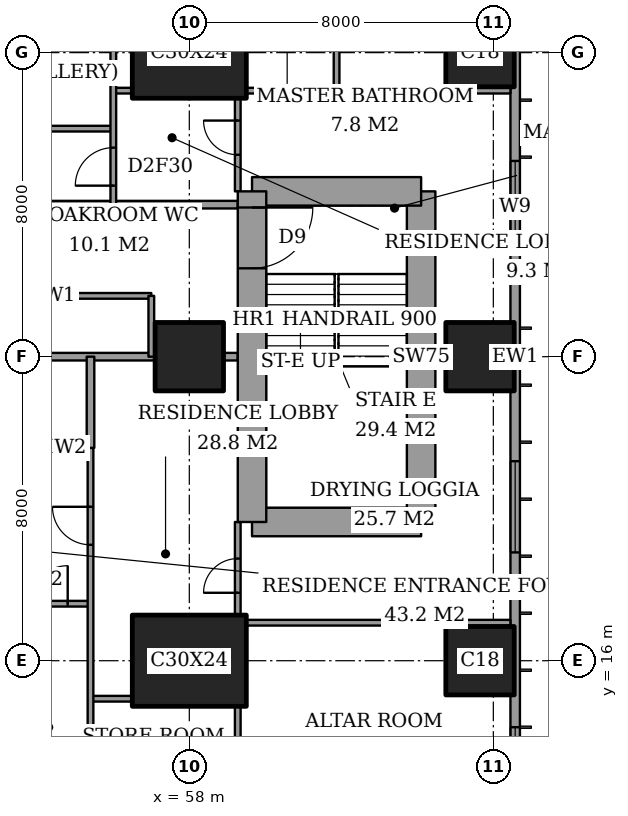
"""IFC4 building model, lengths in metres.
Left out: names, types, materials, properties, quantities, classifications, styles, units other than length and angle.
Written with IfcOpenShell. Run it as: python <this file> out.ifc"""

import sys

from ifc_helpers import new_model, si_unit, direction, frame, frame_2d, origin, origin_2d, place, context, subcontext, project, spatial, rectangle, extrude, element, fill, save


model = new_model("IFC4")
c1 = context("Model", 3, precision=1e-05, world=origin(), true_north=direction((0.0, 1.0)))
c2 = subcontext(c1, "Body", "Model", "MODEL_VIEW")
j1 = project(units=[si_unit("LENGTHUNIT", "METRE"), si_unit("PLANEANGLEUNIT", "RADIAN")], contexts=[c1])
p1 = place(None, origin())
s1 = spatial("IfcSite", under=j1, at=p1, CompositionType="ELEMENT")
p2 = place(p1, origin())
s2 = spatial("IfcBuilding", under=s1, at=p2, CompositionType="ELEMENT")
p3 = place(p2, frame((0.0, 0.0, 218.2)))
s3 = spatial("IfcBuildingStorey", under=s2, at=p3, CompositionType="ELEMENT", Elevation=218.2)
p4 = place(p3, frame((58.0, 16.0, 0.0), z_axis=(0.0, 0.0, 1.0), x_axis=(1.0, 0.0, 0.0)))
e1 = element("IfcColumn", 1, at=p4, inside=s3, PredefinedType="COLUMN", context=c2, shape_type="SweptSolid", body=[
    extrude(rectangle(XDim=3.0, YDim=2.4, at=origin_2d()), origin(), (0.0, 0.0, 1.0), 3.6),
])
p5 = place(p3, frame((58.0, 24.0, 0.0), z_axis=(0.0, 0.0, 1.0), x_axis=(1.0, 0.0, 0.0)))
e2 = element("IfcColumn", 2, at=p5, inside=s3, PredefinedType="COLUMN", context=c2, shape_type="SweptSolid", body=[
    extrude(rectangle(XDim=1.8, YDim=1.8, at=origin_2d()), origin(), (0.0, 0.0, 1.0), 3.6),
])
p6 = place(p3, frame((58.0, 32.0, 0.0), z_axis=(0.0, 0.0, 1.0), x_axis=(1.0, 0.0, 0.0)))
e3 = element("IfcColumn", 3, at=p6, inside=s3, PredefinedType="COLUMN", context=c2, shape_type="SweptSolid", body=[
    extrude(rectangle(XDim=3.0, YDim=2.4, at=origin_2d()), origin(), (0.0, 0.0, 1.0), 3.6),
])
for number, where, z_axis, x_axis in (
    (4, (65.65, 16.0, 0.0), (0.0, 0.0, 1.0), (1.0, 0.0, 0.0)),
    (5, (65.65, 24.0, 0.0), (0.0, 0.0, 1.0), (1.0, 0.0, 0.0)),
    (6, (65.65, 32.0, 0.0), (0.0, 0.0, 1.0), (1.0, 0.0, 0.0)),
):
    element("IfcColumn", number, at=place(p3, frame(where, z_axis=z_axis, x_axis=x_axis)), inside=s3, PredefinedType="COLUMN", context=c2, shape_type="SweptSolid", body=[
        extrude(rectangle(XDim=1.8, YDim=1.8, at=origin_2d()), origin(), (0.0, 0.0, 1.0), 3.6),
    ])
p7 = place(p3, frame((59.65, 19.65, 0.0), z_axis=(0.0, 0.0, 1.0), x_axis=(1.0, 0.0, 0.0)))
e7 = element("IfcWall", 7, at=p7, inside=s3, PredefinedType="SHEAR", context=c2, shape_type="SweptSolid", body=[
    extrude(rectangle(XDim=4.45, YDim=0.75, at=frame_2d((2.225, 0.0))), origin(), (0.0, 0.0, 1.0), 3.6),
])
p8 = place(p3, frame((64.1, 19.65, 0.0), z_axis=(0.0, 0.0, 1.0), x_axis=(0.0, 1.0, 0.0)))
e8 = element("IfcWall", 8, at=p8, inside=s3, PredefinedType="SHEAR", context=c2, shape_type="SweptSolid", body=[
    extrude(rectangle(XDim=8.7, YDim=0.75, at=frame_2d((4.35, 0.0))), origin(), (0.0, 0.0, 1.0), 3.6),
])
p9 = place(p3, frame((64.1, 28.35, 0.0), z_axis=(0.0, 0.0, 1.0), x_axis=(-1.0, 0.0, 0.0)))
e9 = element("IfcWall", 9, at=p9, inside=s3, PredefinedType="SHEAR", context=c2, shape_type="SweptSolid", body=[
    extrude(rectangle(XDim=4.45, YDim=0.75, at=frame_2d((2.225, 0.0))), origin(), (0.0, 0.0, 1.0), 3.6),
])
p10 = place(p3, frame((59.65, 28.35, 0.0), z_axis=(0.0, 0.0, 1.0), x_axis=(0.0, -1.0, 0.0)))
e10 = element("IfcWall", 10, at=p10, inside=s3, PredefinedType="SHEAR", context=c2, shape_type="SweptSolid", body=[
    extrude(rectangle(XDim=8.7, YDim=0.75, at=frame_2d((4.35, 0.0))), origin(), (0.0, 0.0, 1.0), 3.6),
])
p11 = place(p10, frame((0.425, 0.0, 0.0)))
e11 = element("IfcOpeningElement", 11, at=p11, cuts=e10, PredefinedType="OPENING", context=c2, shape_type="SweptSolid", body=[
    extrude(rectangle(XDim=1.6, YDim=2.1, at=frame_2d((0.8, 1.05))), frame((0.0, 0.385, 0.0), z_axis=(0.0, -1.0, 0.0), x_axis=(1.0, 0.0, 0.0)), (0.0, 0.0, 1.0), 0.77),
])
p12 = place(p3, frame((66.575, 3.175, 0.0), z_axis=(0.0, 0.0, 1.0), x_axis=(0.0, 1.0, 0.0)))
e12 = element("IfcWall", 12, at=p12, inside=s3, PredefinedType="SOLIDWALL", context=c2, shape_type="SweptSolid", body=[
    extrude(rectangle(XDim=41.65, YDim=0.25, at=frame_2d((20.825, 0.0))), origin(), (0.0, 0.0, 1.0), 3.6),
])
p13 = place(p12, frame((0.825, 0.0, 0.2)))
e13 = element("IfcOpeningElement", 13, at=p13, cuts=e12, PredefinedType="OPENING", context=c2, shape_type="SweptSolid", body=[
    extrude(rectangle(XDim=2.4, YDim=2.4, at=frame_2d((1.2, 1.2))), frame((0.0, 0.135, 0.0), z_axis=(0.0, -1.0, 0.0), x_axis=(1.0, 0.0, 0.0)), (0.0, 0.0, 1.0), 0.27),
])
p14 = place(p12, frame((6.225, 0.0, 0.2)))
e14 = element("IfcOpeningElement", 14, at=p14, cuts=e12, PredefinedType="OPENING", context=c2, shape_type="SweptSolid", body=[
    extrude(rectangle(XDim=1.2, YDim=2.4, at=frame_2d((0.6, 1.2))), frame((0.0, 0.135, 0.0), z_axis=(0.0, -1.0, 0.0), x_axis=(1.0, 0.0, 0.0)), (0.0, 0.0, 1.0), 0.27),
])
p15 = place(p12, frame((8.675, 0.0, 0.2)))
e15 = element("IfcOpeningElement", 15, at=p15, cuts=e12, PredefinedType="OPENING", context=c2, shape_type="SweptSolid", body=[
    extrude(rectangle(XDim=2.4, YDim=2.4, at=frame_2d((1.2, 1.2))), frame((0.0, 0.135, 0.0), z_axis=(0.0, -1.0, 0.0), x_axis=(1.0, 0.0, 0.0)), (0.0, 0.0, 1.0), 0.27),
])
p16 = place(p12, frame((15.675, 0.0, 0.2)))
e16 = element("IfcOpeningElement", 16, at=p16, cuts=e12, PredefinedType="OPENING", context=c2, shape_type="SweptSolid", body=[
    extrude(rectangle(XDim=2.4, YDim=2.4, at=frame_2d((1.2, 1.2))), frame((0.0, 0.135, 0.0), z_axis=(0.0, -1.0, 0.0), x_axis=(1.0, 0.0, 0.0)), (0.0, 0.0, 1.0), 0.27),
])
p17 = place(p12, frame((23.575, 0.0, 0.2)))
e17 = element("IfcOpeningElement", 17, at=p17, cuts=e12, PredefinedType="OPENING", context=c2, shape_type="SweptSolid", body=[
    extrude(rectangle(XDim=2.4, YDim=2.4, at=frame_2d((1.2, 1.2))), frame((0.0, 0.135, 0.0), z_axis=(0.0, -1.0, 0.0), x_axis=(1.0, 0.0, 0.0)), (0.0, 0.0, 1.0), 0.27),
])
p18 = place(p12, frame((30.775, 0.0, 0.2)))
e18 = element("IfcOpeningElement", 18, at=p18, cuts=e12, PredefinedType="OPENING", context=c2, shape_type="SweptSolid", body=[
    extrude(rectangle(XDim=2.4, YDim=2.4, at=frame_2d((1.2, 1.2))), frame((0.0, 0.135, 0.0), z_axis=(0.0, -1.0, 0.0), x_axis=(1.0, 0.0, 0.0)), (0.0, 0.0, 1.0), 0.27),
])
p19 = place(p12, frame((34.55, 0.0, 0.2)))
e19 = element("IfcOpeningElement", 19, at=p19, cuts=e12, PredefinedType="OPENING", context=c2, shape_type="SweptSolid", body=[
    extrude(rectangle(XDim=1.2, YDim=2.4, at=frame_2d((0.6, 1.2))), frame((0.0, 0.135, 0.0), z_axis=(0.0, -1.0, 0.0), x_axis=(1.0, 0.0, 0.0)), (0.0, 0.0, 1.0), 0.27),
])
p20 = place(p12, frame((38.425, 0.0, 0.2)))
e20 = element("IfcOpeningElement", 20, at=p20, cuts=e12, PredefinedType="OPENING", context=c2, shape_type="SweptSolid", body=[
    extrude(rectangle(XDim=2.4, YDim=2.4, at=frame_2d((1.2, 1.2))), frame((0.0, 0.135, 0.0), z_axis=(0.0, -1.0, 0.0), x_axis=(1.0, 0.0, 0.0)), (0.0, 0.0, 1.0), 0.27),
])
p21 = place(p3, frame((55.4, 15.0, 0.0), z_axis=(0.0, 0.0, 1.0), x_axis=(1.0, 0.0, 0.0)))
e21 = element("IfcWall", 21, at=p21, inside=s3, PredefinedType="PARTITIONING", context=c2, shape_type="SweptSolid", body=[
    extrude(rectangle(XDim=1.1, YDim=0.15, at=frame_2d((0.55, 0.0))), origin(), (0.0, 0.0, 1.0), 3.35),
])
p22 = place(p3, frame((59.5, 17.0, 0.0), z_axis=(0.0, 0.0, 1.0), x_axis=(1.0, 0.0, 0.0)))
e22 = element("IfcWall", 22, at=p22, inside=s3, PredefinedType="PARTITIONING", context=c2, shape_type="SweptSolid", body=[
    extrude(rectangle(XDim=6.95, YDim=0.15, at=frame_2d((3.475, 0.0))), origin(), (0.0, 0.0, 1.0), 3.35),
])
p23 = place(p3, frame((51.6, 17.5, 0.0), z_axis=(0.0, 0.0, 1.0), x_axis=(1.0, 0.0, 0.0)))
e23 = element("IfcWall", 23, at=p23, inside=s3, PredefinedType="PARTITIONING", context=c2, shape_type="SweptSolid", body=[
    extrude(rectangle(XDim=3.8, YDim=0.15, at=frame_2d((1.9, 0.0))), origin(), (0.0, 0.0, 1.0), 3.35),
])
p24 = place(p23, frame((2.2, 0.0, 0.0)))
e24 = element("IfcOpeningElement", 24, at=p24, cuts=e23, PredefinedType="OPENING", context=c2, shape_type="SweptSolid", body=[
    extrude(rectangle(XDim=1.0, YDim=2.1, at=frame_2d((0.5, 1.05))), frame((0.0, 0.085, 0.0), z_axis=(0.0, -1.0, 0.0), x_axis=(1.0, 0.0, 0.0)), (0.0, 0.0, 1.0), 0.17),
])
p25 = place(p3, frame((51.2, 21.6, 0.0), z_axis=(0.0, 0.0, 1.0), x_axis=(1.0, 0.0, 0.0)))
e25 = element("IfcWall", 25, at=p25, inside=s3, PredefinedType="PARTITIONING", context=c2, shape_type="SweptSolid", body=[
    extrude(rectangle(XDim=4.2, YDim=0.2, at=frame_2d((2.1, 0.0))), origin(), (0.0, 0.0, 1.0), 3.35),
])
p26 = place(p25, frame((1.65, 0.0, 0.0)))
e26 = element("IfcOpeningElement", 26, at=p26, cuts=e25, PredefinedType="OPENING", context=c2, shape_type="SweptSolid", body=[
    extrude(rectangle(XDim=0.9, YDim=2.1, at=frame_2d((0.45, 1.05))), frame((0.0, 0.11, 0.0), z_axis=(0.0, -1.0, 0.0), x_axis=(1.0, 0.0, 0.0)), (0.0, 0.0, 1.0), 0.22),
])
p27 = place(p3, frame((50.9, 24.0, 0.0), z_axis=(0.0, 0.0, 1.0), x_axis=(1.0, 0.0, 0.0)))
e27 = element("IfcWall", 27, at=p27, inside=s3, PredefinedType="PARTITIONING", context=c2, shape_type="SweptSolid", body=[
    extrude(rectangle(XDim=6.2, YDim=0.2, at=frame_2d((3.1, 0.0))), origin(), (0.0, 0.0, 1.0), 3.35),
])
p28 = place(p3, frame((58.9, 24.0, 0.0), z_axis=(0.0, 0.0, 1.0), x_axis=(1.0, 0.0, 0.0)))
e28 = element("IfcWall", 28, at=p28, inside=s3, PredefinedType="PARTITIONING", context=c2, shape_type="SweptSolid", body=[
    extrude(rectangle(XDim=0.375, YDim=0.2, at=frame_2d((0.188, 0.0))), origin(), (0.0, 0.0, 1.0), 3.35),
])
p29 = place(p3, frame((48.6, 25.6, 0.0), z_axis=(0.0, 0.0, 1.0), x_axis=(1.0, 0.0, 0.0)))
e29 = element("IfcWall", 29, at=p29, inside=s3, PredefinedType="PARTITIONING", context=c2, shape_type="SweptSolid", body=[
    extrude(rectangle(XDim=8.4, YDim=0.15, at=frame_2d((4.2, 0.0))), origin(), (0.0, 0.0, 1.0), 3.35),
])
p30 = place(p29, frame((3.75, 0.0, 0.0)))
e30 = element("IfcOpeningElement", 30, at=p30, cuts=e29, PredefinedType="OPENING", context=c2, shape_type="SweptSolid", body=[
    extrude(rectangle(XDim=0.9, YDim=2.1, at=frame_2d((0.45, 1.05))), frame((0.0, 0.085, 0.0), z_axis=(0.0, -1.0, 0.0), x_axis=(1.0, 0.0, 0.0)), (0.0, 0.0, 1.0), 0.17),
])
p31 = place(p3, frame((42.0, 28.0, 0.0), z_axis=(0.0, 0.0, 1.0), x_axis=(1.0, 0.0, 0.0)))
e31 = element("IfcWall", 31, at=p31, inside=s3, PredefinedType="PARTITIONING", context=c2, shape_type="SweptSolid", body=[
    extrude(rectangle(XDim=17.275, YDim=0.2, at=frame_2d((8.637, 0.0))), origin(), (0.0, 0.0, 1.0), 3.35),
])
p32 = place(p31, frame((9.4, 0.0, 0.0)))
e32 = element("IfcOpeningElement", 32, at=p32, cuts=e31, PredefinedType="OPENING", context=c2, shape_type="SweptSolid", body=[
    extrude(rectangle(XDim=1.2, YDim=2.4, at=frame_2d((0.6, 1.2))), frame((0.0, 0.11, 0.0), z_axis=(0.0, -1.0, 0.0), x_axis=(1.0, 0.0, 0.0)), (0.0, 0.0, 1.0), 0.22),
])
p33 = place(p3, frame((51.6, 30.0, 0.0), z_axis=(0.0, 0.0, 1.0), x_axis=(1.0, 0.0, 0.0)))
e33 = element("IfcWall", 33, at=p33, inside=s3, PredefinedType="PARTITIONING", context=c2, shape_type="SweptSolid", body=[
    extrude(rectangle(XDim=4.4, YDim=0.15, at=frame_2d((2.2, 0.0))), origin(), (0.0, 0.0, 1.0), 3.35),
])
p34 = place(p33, frame((0.6, 0.0, 0.0)))
e34 = element("IfcOpeningElement", 34, at=p34, cuts=e33, PredefinedType="OPENING", context=c2, shape_type="SweptSolid", body=[
    extrude(rectangle(XDim=1.0, YDim=2.1, at=frame_2d((0.5, 1.05))), frame((0.0, 0.085, 0.0), z_axis=(0.0, -1.0, 0.0), x_axis=(1.0, 0.0, 0.0)), (0.0, 0.0, 1.0), 0.17),
])
p35 = place(p3, frame((56.0, 31.0, 0.0), z_axis=(0.0, 0.0, 1.0), x_axis=(1.0, 0.0, 0.0)))
e35 = element("IfcWall", 35, at=p35, inside=s3, PredefinedType="PARTITIONING", context=c2, shape_type="SweptSolid", body=[
    extrude(rectangle(XDim=0.5, YDim=0.15, at=frame_2d((0.25, 0.0))), origin(), (0.0, 0.0, 1.0), 3.35),
])
p36 = place(p3, frame((59.5, 31.0, 0.0), z_axis=(0.0, 0.0, 1.0), x_axis=(1.0, 0.0, 0.0)))
e36 = element("IfcWall", 36, at=p36, inside=s3, PredefinedType="PARTITIONING", context=c2, shape_type="SweptSolid", body=[
    extrude(rectangle(XDim=6.95, YDim=0.15, at=frame_2d((3.475, 0.0))), origin(), (0.0, 0.0, 1.0), 3.35),
])
p37 = place(p3, frame((55.4, 21.6, 0.0), z_axis=(0.0, 0.0, 1.0), x_axis=(0.0, 1.0, 0.0)))
e37 = element("IfcWall", 37, at=p37, inside=s3, PredefinedType="PARTITIONING", context=c2, shape_type="SweptSolid", body=[
    extrude(rectangle(XDim=2.4, YDim=0.2, at=frame_2d((1.2, 0.0))), origin(), (0.0, 0.0, 1.0), 3.35),
])
p38 = place(p3, frame((55.4, 11.0, 0.0), z_axis=(0.0, 0.0, 1.0), x_axis=(0.0, 1.0, 0.0)))
e38 = element("IfcWall", 38, at=p38, inside=s3, PredefinedType="PARTITIONING", context=c2, shape_type="SweptSolid", body=[
    extrude(rectangle(XDim=10.6, YDim=0.15, at=frame_2d((5.3, 0.0))), origin(), (0.0, 0.0, 1.0), 3.35),
])
p39 = place(p38, frame((8.05, 0.0, 0.0)))
e39 = element("IfcOpeningElement", 39, at=p39, cuts=e38, PredefinedType="OPENING", context=c2, shape_type="SweptSolid", body=[
    extrude(rectangle(XDim=1.0, YDim=2.1, at=frame_2d((0.5, 1.05))), frame((0.0, 0.085, 0.0), z_axis=(0.0, -1.0, 0.0), x_axis=(1.0, 0.0, 0.0)), (0.0, 0.0, 1.0), 0.17),
])
p40 = place(p3, frame((56.0, 28.0, 0.0), z_axis=(0.0, 0.0, 1.0), x_axis=(0.0, 1.0, 0.0)))
e40 = element("IfcWall", 40, at=p40, inside=s3, PredefinedType="PARTITIONING", context=c2, shape_type="SweptSolid", body=[
    extrude(rectangle(XDim=9.4, YDim=0.15, at=frame_2d((4.7, 0.0))), origin(), (0.0, 0.0, 1.0), 3.35),
])
p41 = place(p40, frame((0.5, 0.0, 0.0)))
e41 = element("IfcOpeningElement", 41, at=p41, cuts=e40, PredefinedType="OPENING", context=c2, shape_type="SweptSolid", body=[
    extrude(rectangle(XDim=1.0, YDim=2.1, at=frame_2d((0.5, 1.05))), frame((0.0, 0.085, 0.0), z_axis=(0.0, -1.0, 0.0), x_axis=(1.0, 0.0, 0.0)), (0.0, 0.0, 1.0), 0.17),
])
p42 = place(p3, frame((57.0, 24.0, 0.0), z_axis=(0.0, 0.0, 1.0), x_axis=(0.0, 1.0, 0.0)))
e42 = element("IfcWall", 42, at=p42, inside=s3, PredefinedType="PARTITIONING", context=c2, shape_type="SweptSolid", body=[
    extrude(rectangle(XDim=1.6, YDim=0.15, at=frame_2d((0.8, 0.0))), origin(), (0.0, 0.0, 1.0), 3.35),
])
p43 = place(p3, frame((59.275, 11.0, 0.0), z_axis=(0.0, 0.0, 1.0), x_axis=(0.0, 1.0, 0.0)))
e43 = element("IfcWall", 43, at=p43, inside=s3, PredefinedType="PARTITIONING", context=c2, shape_type="SweptSolid", body=[
    extrude(rectangle(XDim=3.8, YDim=0.15, at=frame_2d((1.9, 0.0))), origin(), (0.0, 0.0, 1.0), 3.35),
])
p44 = place(p3, frame((59.275, 17.2, 0.0), z_axis=(0.0, 0.0, 1.0), x_axis=(0.0, 1.0, 0.0)))
e44 = element("IfcWall", 44, at=p44, inside=s3, PredefinedType="PARTITIONING", context=c2, shape_type="SweptSolid", body=[
    extrude(rectangle(XDim=2.45, YDim=0.15, at=frame_2d((1.225, 0.0))), origin(), (0.0, 0.0, 1.0), 3.35),
])
p45 = place(p44, frame((0.587, 0.0, 0.0)))
e45 = element("IfcOpeningElement", 45, at=p45, cuts=e44, PredefinedType="OPENING", context=c2, shape_type="SweptSolid", body=[
    extrude(rectangle(XDim=0.9, YDim=2.1, at=frame_2d((0.45, 1.05))), frame((0.0, 0.085, 0.0), z_axis=(0.0, -1.0, 0.0), x_axis=(1.0, 0.0, 0.0)), (0.0, 0.0, 1.0), 0.17),
])
p46 = place(p3, frame((59.275, 28.35, 0.0), z_axis=(0.0, 0.0, 1.0), x_axis=(0.0, 1.0, 0.0)))
e46 = element("IfcWall", 46, at=p46, inside=s3, PredefinedType="PARTITIONING", context=c2, shape_type="SweptSolid", body=[
    extrude(rectangle(XDim=2.45, YDim=0.15, at=frame_2d((1.225, 0.0))), origin(), (0.0, 0.0, 1.0), 3.35),
])
p47 = place(p46, frame((0.962, 0.0, 0.0)))
e47 = element("IfcOpeningElement", 47, at=p47, cuts=e46, PredefinedType="OPENING", context=c2, shape_type="SweptSolid", body=[
    extrude(rectangle(XDim=0.9, YDim=2.1, at=frame_2d((0.45, 1.05))), frame((0.0, 0.085, 0.0), z_axis=(0.0, -1.0, 0.0), x_axis=(1.0, 0.0, 0.0)), (0.0, 0.0, 1.0), 0.17),
])
p48 = place(p3, frame((61.875, 31.0, 0.0), z_axis=(0.0, 0.0, 1.0), x_axis=(0.0, 1.0, 0.0)))
e48 = element("IfcWall", 48, at=p48, inside=s3, PredefinedType="PARTITIONING", context=c2, shape_type="SweptSolid", body=[
    extrude(rectangle(XDim=3.0, YDim=0.15, at=frame_2d((1.5, 0.0))), origin(), (0.0, 0.0, 1.0), 3.35),
])
p49 = place(p48, frame((1.05, 0.0, 0.0)))
e49 = element("IfcOpeningElement", 49, at=p49, cuts=e48, PredefinedType="OPENING", context=c2, shape_type="SweptSolid", body=[
    extrude(rectangle(XDim=0.9, YDim=2.1, at=frame_2d((0.45, 1.05))), frame((0.0, 0.085, 0.0), z_axis=(0.0, -1.0, 0.0), x_axis=(1.0, 0.0, 0.0)), (0.0, 0.0, 1.0), 0.17),
])
p50 = place(p15, origin())
e50 = element("IfcWindow", 50, at=p50, inside=s3, PartitioningType="SINGLE_PANEL", PredefinedType="WINDOW", context=c2, shape_type="SweptSolid", body=[
    extrude(rectangle(XDim=2.4, YDim=2.4, at=frame_2d((1.2, 1.2))), frame((0.0, 0.03, 0.0), z_axis=(0.0, -1.0, 0.0), x_axis=(1.0, 0.0, 0.0)), (0.0, 0.0, 1.0), 0.06),
])
fill(e15, e50)
p51 = place(p16, origin())
e51 = element("IfcWindow", 51, at=p51, inside=s3, PartitioningType="SINGLE_PANEL", PredefinedType="WINDOW", context=c2, shape_type="SweptSolid", body=[
    extrude(rectangle(XDim=2.4, YDim=2.4, at=frame_2d((1.2, 1.2))), frame((0.0, 0.03, 0.0), z_axis=(0.0, -1.0, 0.0), x_axis=(1.0, 0.0, 0.0)), (0.0, 0.0, 1.0), 0.06),
])
fill(e16, e51)
p52 = place(p17, origin())
e52 = element("IfcWindow", 52, at=p52, inside=s3, PartitioningType="SINGLE_PANEL", PredefinedType="WINDOW", context=c2, shape_type="SweptSolid", body=[
    extrude(rectangle(XDim=2.4, YDim=2.4, at=frame_2d((1.2, 1.2))), frame((0.0, 0.03, 0.0), z_axis=(0.0, -1.0, 0.0), x_axis=(1.0, 0.0, 0.0)), (0.0, 0.0, 1.0), 0.06),
])
fill(e17, e52)
p53 = place(p45, origin())
e53 = element("IfcDoor", 53, at=p53, inside=s3, OperationType="SINGLE_SWING_RIGHT", PredefinedType="DOOR", context=c2, shape_type="SweptSolid", body=[
    extrude(rectangle(XDim=0.9, YDim=2.1, at=frame_2d((0.45, 1.05))), frame((0.0, 0.025, 0.0), z_axis=(0.0, -1.0, 0.0), x_axis=(1.0, 0.0, 0.0)), (0.0, 0.0, 1.0), 0.05),
])
fill(e45, e53)
p54 = place(p39, origin())
e54 = element("IfcDoor", 54, at=p54, inside=s3, OperationType="SINGLE_SWING_LEFT", PredefinedType="DOOR", context=c2, shape_type="SweptSolid", body=[
    extrude(rectangle(XDim=1.0, YDim=2.1, at=frame_2d((0.5, 1.05))), frame((0.0, 0.025, 0.0), z_axis=(0.0, -1.0, 0.0), x_axis=(1.0, 0.0, 0.0)), (0.0, 0.0, 1.0), 0.05),
])
fill(e39, e54)
p55 = place(p24, origin())
e55 = element("IfcDoor", 55, at=p55, inside=s3, OperationType="SINGLE_SWING_LEFT", PredefinedType="DOOR", context=c2, shape_type="SweptSolid", body=[
    extrude(rectangle(XDim=1.0, YDim=2.1, at=frame_2d((0.5, 1.05))), frame((0.0, 0.025, 0.0), z_axis=(0.0, -1.0, 0.0), x_axis=(1.0, 0.0, 0.0)), (0.0, 0.0, 1.0), 0.05),
])
fill(e24, e55)
p56 = place(p47, origin())
e56 = element("IfcDoor", 56, at=p56, inside=s3, OperationType="SINGLE_SWING_LEFT", PredefinedType="DOOR", context=c2, shape_type="SweptSolid", body=[
    extrude(rectangle(XDim=0.9, YDim=2.1, at=frame_2d((0.45, 1.05))), frame((0.0, 0.025, 0.0), z_axis=(0.0, -1.0, 0.0), x_axis=(1.0, 0.0, 0.0)), (0.0, 0.0, 1.0), 0.05),
])
fill(e47, e56)
p57 = place(p41, origin())
e57 = element("IfcDoor", 57, at=p57, inside=s3, OperationType="SINGLE_SWING_RIGHT", PredefinedType="DOOR", context=c2, shape_type="SweptSolid", body=[
    extrude(rectangle(XDim=1.0, YDim=2.1, at=frame_2d((0.5, 1.05))), frame((0.0, 0.025, 0.0), z_axis=(0.0, -1.0, 0.0), x_axis=(1.0, 0.0, 0.0)), (0.0, 0.0, 1.0), 0.05),
])
fill(e41, e57)
p58 = place(p11, origin())
e58 = element("IfcDoor", 58, at=p58, inside=s3, OperationType="DOUBLE_DOOR_SINGLE_SWING", PredefinedType="DOOR", context=c2, shape_type="SweptSolid", body=[
    extrude(rectangle(XDim=1.6, YDim=2.1, at=frame_2d((0.8, 1.05))), frame((0.0, 0.025, 0.0), z_axis=(0.0, -1.0, 0.0), x_axis=(1.0, 0.0, 0.0)), (0.0, 0.0, 1.0), 0.05),
])
fill(e11, e58)
save(model, sys.argv[1])
